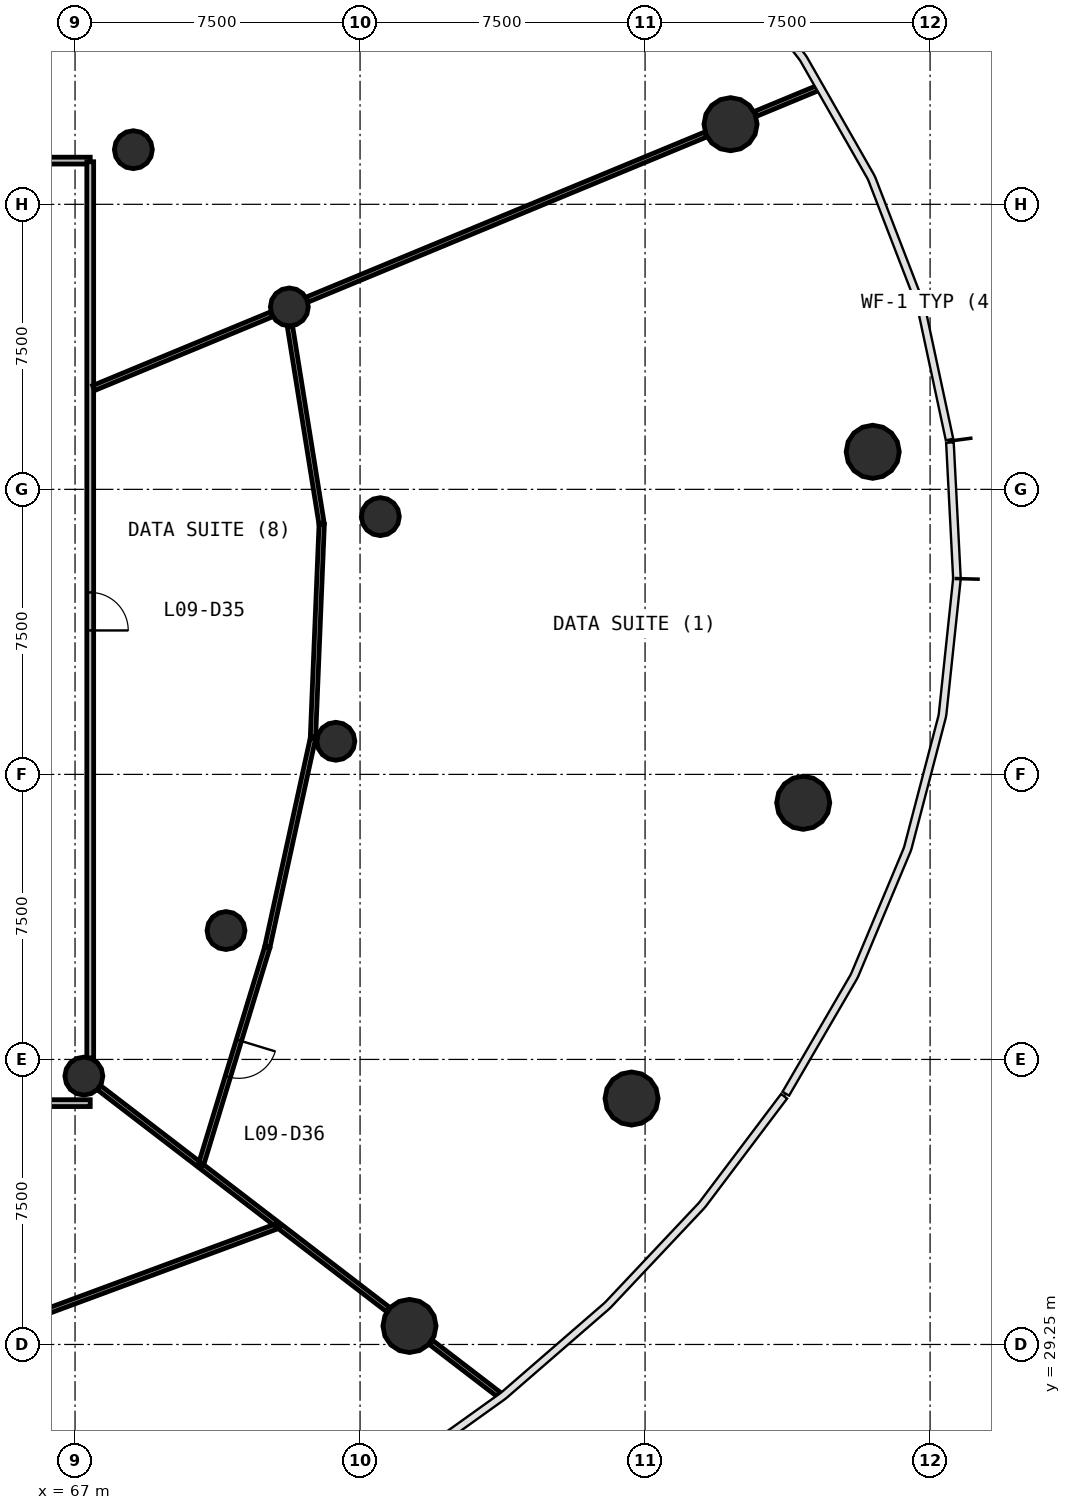
"""IFC4 building model, lengths in metres.
Left out: names, types, materials, properties, quantities, classifications, styles, units other than length and angle.
Written with IfcOpenShell. Run it as: python <this file> out.ifc"""

import sys

from ifc_helpers import new_model, si_unit, direction, frame, frame_2d, origin, origin_2d, place, context, subcontext, project, spatial, rectangle, circle, extrude, source, transform, mapped, element, fill, save


model = new_model("IFC4")
c1 = context("Model", 3, precision=1e-05, world=origin(), true_north=direction((0.0, 1.0)))
c2 = subcontext(c1, "Body", "Model", "MODEL_VIEW")
j1 = project(units=[si_unit("LENGTHUNIT", "METRE"), si_unit("PLANEANGLEUNIT", "RADIAN")], contexts=[c1])
p1 = place(None, origin())
s1 = spatial("IfcSite", under=j1, at=p1, CompositionType="ELEMENT")
p2 = place(p1, origin())
s2 = spatial("IfcBuilding", under=s1, at=p2, CompositionType="ELEMENT")
p3 = place(p2, frame((0.0, 0.0, 40.2)))
s3 = spatial("IfcBuildingStorey", under=s2, at=p3, CompositionType="ELEMENT", Elevation=40.2)
m1 = source(origin(), c2, "Body", "SweptSolid", [
    extrude(circle(Radius=0.7, at=origin_2d()), origin(), (0.0, 0.0, 1.0), 4.4),
])
for number, where, z_axis, x_axis in (
    (1, (87.99, 52.738, 0.0), (0.0, 0.0, 1.0), (1.0, 0.0, 0.0)),
    (2, (84.249, 61.358, 0.0), (0.0, 0.0, 1.0), (1.0, 0.0, 0.0)),
    (3, (75.801, 29.737, 0.0), (0.0, 0.0, 1.0), (1.0, 0.0, 0.0)),
    (4, (81.645, 35.721, 0.0), (0.0, 0.0, 1.0), (1.0, 0.0, 0.0)),
    (5, (86.161, 43.503, 0.0), (0.0, 0.0, 1.0), (1.0, 0.0, 0.0)),
):
    element("IfcColumn", number, at=place(p3, frame(where, z_axis=z_axis, x_axis=x_axis)), inside=s3, PredefinedType="COLUMN", context=c2, shape_type="MappedRepresentation", body=[
        mapped(m1, transform((0.0, 0.0, 0.0), scale=1.0)),
    ])
m2 = source(origin(), c2, "Body", "SweptSolid", [
    extrude(circle(Radius=0.5, at=origin_2d()), origin(), (0.0, 0.0, 1.0), 4.4),
])
for number, where, z_axis, x_axis in (
    (6, (75.034, 51.032, 0.0), (0.0, 0.0, 1.0), (1.0, 0.0, 0.0)),
    (7, (72.639, 56.549, 0.0), (0.0, 0.0, 1.0), (1.0, 0.0, 0.0)),
    (8, (68.535, 60.688, 0.0), (0.0, 0.0, 1.0), (1.0, 0.0, 0.0)),
    (9, (67.232, 36.312, 0.0), (0.0, 0.0, 1.0), (1.0, 0.0, 0.0)),
    (10, (70.972, 40.141, 0.0), (0.0, 0.0, 1.0), (1.0, 0.0, 0.0)),
    (11, (73.863, 45.122, 0.0), (0.0, 0.0, 1.0), (1.0, 0.0, 0.0)),
):
    element("IfcColumn", number, at=place(p3, frame(where, z_axis=z_axis, x_axis=x_axis)), inside=s3, PredefinedType="COLUMN", context=c2, shape_type="MappedRepresentation", body=[
        mapped(m2, transform((0.0, 0.0, 0.0), scale=1.0)),
    ])
p4 = place(p3, frame((67.4, 35.6, 0.0), z_axis=(0.0, 0.0, 1.0), x_axis=(-1.0, 0.0, 0.0)))
e12 = element("IfcWall", 12, at=p4, inside=s3, PredefinedType="PARTITIONING", context=c2, shape_type="SweptSolid", body=[
    extrude(rectangle(XDim=30.8, YDim=0.18, at=frame_2d((15.4, 0.0))), origin(), (0.0, 0.0, 1.0), 3.05),
])
p5 = place(p4, frame((17.35, 0.0, 0.0)))
e13 = element("IfcOpeningElement", 13, at=p5, cuts=e12, PredefinedType="OPENING", context=c2, shape_type="SweptSolid", body=[
    extrude(rectangle(XDim=1.0, YDim=2.1, at=frame_2d((0.5, 1.05))), frame((0.0, 0.1, 0.0), z_axis=(0.0, -1.0, 0.0), x_axis=(1.0, 0.0, 0.0)), (0.0, 0.0, 1.0), 0.2),
])
p6 = place(p4, frame((14.95, 0.0, 0.0)))
e14 = element("IfcOpeningElement", 14, at=p6, cuts=e12, PredefinedType="OPENING", context=c2, shape_type="SweptSolid", body=[
    extrude(rectangle(XDim=1.0, YDim=2.1, at=frame_2d((0.5, 1.05))), frame((0.0, 0.1, 0.0), z_axis=(0.0, -1.0, 0.0), x_axis=(1.0, 0.0, 0.0)), (0.0, 0.0, 1.0), 0.2),
])
p7 = place(p3, frame((36.6, 60.4, 0.0), z_axis=(0.0, 0.0, 1.0), x_axis=(1.0, 0.0, 0.0)))
e15 = element("IfcWall", 15, at=p7, inside=s3, PredefinedType="PARTITIONING", context=c2, shape_type="SweptSolid", body=[
    extrude(rectangle(XDim=30.8, YDim=0.18, at=frame_2d((15.4, 0.0))), origin(), (0.0, 0.0, 1.0), 3.05),
])
p8 = place(p7, frame((20.95, 0.0, 0.0)))
e16 = element("IfcOpeningElement", 16, at=p8, cuts=e15, PredefinedType="OPENING", context=c2, shape_type="SweptSolid", body=[
    extrude(rectangle(XDim=1.0, YDim=2.1, at=frame_2d((0.5, 1.05))), frame((0.0, 0.1, 0.0), z_axis=(0.0, -1.0, 0.0), x_axis=(1.0, 0.0, 0.0)), (0.0, 0.0, 1.0), 0.2),
])
p9 = place(p7, frame((14.95, 0.0, 0.0)))
e17 = element("IfcOpeningElement", 17, at=p9, cuts=e15, PredefinedType="OPENING", context=c2, shape_type="SweptSolid", body=[
    extrude(rectangle(XDim=1.0, YDim=2.1, at=frame_2d((0.5, 1.05))), frame((0.0, 0.1, 0.0), z_axis=(0.0, -1.0, 0.0), x_axis=(1.0, 0.0, 0.0)), (0.0, 0.0, 1.0), 0.2),
])
p10 = place(p7, frame((8.95, 0.0, 0.0)))
e18 = element("IfcOpeningElement", 18, at=p10, cuts=e15, PredefinedType="OPENING", context=c2, shape_type="SweptSolid", body=[
    extrude(rectangle(XDim=1.0, YDim=2.1, at=frame_2d((0.5, 1.05))), frame((0.0, 0.1, 0.0), z_axis=(0.0, -1.0, 0.0), x_axis=(1.0, 0.0, 0.0)), (0.0, 0.0, 1.0), 0.2),
])
p11 = place(p3, frame((67.4, 60.37, 0.0), z_axis=(0.0, 0.0, 1.0), x_axis=(0.0, -1.0, 0.0)))
e19 = element("IfcWall", 19, at=p11, inside=s3, PredefinedType="PARTITIONING", context=c2, shape_type="SweptSolid", body=[
    extrude(rectangle(XDim=23.583, YDim=0.18, at=frame_2d((11.791, 0.0))), origin(), (0.0, 0.0, 1.0), 3.05),
])
p12 = place(p11, frame((11.333, 0.0, 0.0)))
e20 = element("IfcOpeningElement", 20, at=p12, cuts=e19, PredefinedType="OPENING", context=c2, shape_type="SweptSolid", body=[
    extrude(rectangle(XDim=1.0, YDim=2.1, at=frame_2d((0.5, 1.05))), frame((0.0, 0.1, 0.0), z_axis=(0.0, -1.0, 0.0), x_axis=(1.0, 0.0, 0.0)), (0.0, 0.0, 1.0), 0.2),
])
p13 = place(p3, frame((73.106, 56.742, 0.0), z_axis=(0.0, 0.0, 1.0), x_axis=(0.923875075531, 0.382694192291, 0.0)))
e21 = element("IfcWall", 21, at=p13, inside=s3, PredefinedType="PARTITIONING", context=c2, shape_type="SweptSolid", body=[
    extrude(rectangle(XDim=11.356, YDim=0.14, at=frame_2d((5.678, 0.0))), origin(), (0.0, 0.0, 1.0), 3.05),
])
p14 = place(p3, frame((65.84, 29.964, 0.0), z_axis=(0.0, 0.0, 1.0), x_axis=(0.937795770534, 0.347187402953, 0.0)))
e22 = element("IfcWall", 22, at=p14, inside=s3, PredefinedType="PARTITIONING", context=c2, shape_type="SweptSolid", body=[
    extrude(rectangle(XDim=6.952, YDim=0.14, at=frame_2d((3.476, 0.0))), origin(), (0.0, 0.0, 1.0), 3.05),
])
p15 = place(p3, frame((72.056, 39.692, 0.0), z_axis=(0.0, 0.0, 1.0), x_axis=(-0.291746072941, -0.95649580706, 0.0)))
e23 = element("IfcWall", 23, at=p15, inside=s3, PredefinedType="PARTITIONING", context=c2, shape_type="SweptSolid", body=[
    extrude(rectangle(XDim=6.0, YDim=0.14, at=frame_2d((3.0, 0.0))), origin(), (0.0, 0.0, 1.0), 3.05),
])
p16 = place(p15, frame((2.55, 0.0, 0.0)))
e24 = element("IfcOpeningElement", 24, at=p16, cuts=e23, PredefinedType="OPENING", context=c2, shape_type="SweptSolid", body=[
    extrude(rectangle(XDim=1.0, YDim=2.1, at=frame_2d((0.5, 1.05))), frame((0.0, 0.08, 0.0), z_axis=(0.0, -1.0, 0.0), x_axis=(1.0, 0.0, 0.0)), (0.0, 0.0, 1.0), 0.16),
])
p17 = place(p3, frame((72.063, 39.722, 0.0), z_axis=(0.0, 0.0, 1.0), x_axis=(0.213380114585, 0.97696925576, 0.0)))
e25 = element("IfcWall", 25, at=p17, inside=s3, PredefinedType="PARTITIONING", context=c2, shape_type="SweptSolid", body=[
    extrude(rectangle(XDim=5.609, YDim=0.14, at=frame_2d((2.804, 0.0))), origin(), (0.0, 0.0, 1.0), 3.05),
])
p18 = place(p3, frame((73.261, 45.231, 0.0), z_axis=(0.0, 0.0, 1.0), x_axis=(0.041003428889, 0.999159005774, 0.0)))
e26 = element("IfcWall", 26, at=p18, inside=s3, PredefinedType="PARTITIONING", context=c2, shape_type="SweptSolid", body=[
    extrude(rectangle(XDim=5.603, YDim=0.14, at=frame_2d((2.801, 0.0))), origin(), (0.0, 0.0, 1.0), 3.05),
])
p19 = place(p3, frame((73.486, 50.859, 0.0), z_axis=(0.0, 0.0, 1.0), x_axis=(-0.158320440448, 0.987387785086, 0.0)))
e27 = element("IfcWall", 27, at=p19, inside=s3, PredefinedType="PARTITIONING", context=c2, shape_type="SweptSolid", body=[
    extrude(rectangle(XDim=5.252, YDim=0.14, at=frame_2d((2.626, 0.0))), origin(), (0.0, 0.0, 1.0), 3.05),
])
p20 = place(p3, frame((67.49, 54.416, 0.0), z_axis=(0.0, 0.0, 1.0), x_axis=(0.923890025086, 0.382658100067, 0.0)))
e28 = element("IfcWall", 28, at=p20, inside=s3, PredefinedType="PARTITIONING", context=c2, shape_type="SweptSolid", body=[
    extrude(rectangle(XDim=5.068, YDim=0.14, at=frame_2d((2.534, 0.0))), origin(), (0.0, 0.0, 1.0), 3.05),
])
p21 = place(p3, frame((72.383, 32.359, 0.0), z_axis=(0.0, 0.0, 1.0), x_axis=(0.793374011923, -0.608734488267, 0.0)))
e29 = element("IfcWall", 29, at=p21, inside=s3, PredefinedType="PARTITIONING", context=c2, shape_type="SweptSolid", body=[
    extrude(rectangle(XDim=3.603, YDim=0.14, at=frame_2d((1.802, 0.0))), origin(), (0.0, 0.0, 1.0), 3.05),
])
p22 = place(p3, frame((67.633, 36.005, 0.0), z_axis=(0.0, 0.0, 1.0), x_axis=(0.793345111692, -0.608772152579, 0.0)))
e30 = element("IfcWall", 30, at=p22, inside=s3, PredefinedType="PARTITIONING", context=c2, shape_type="SweptSolid", body=[
    extrude(rectangle(XDim=3.295, YDim=0.14, at=frame_2d((1.647, 0.0))), origin(), (0.0, 0.0, 1.0), 3.05),
])
p23 = place(p3, frame((70.33, 33.935, 0.0), z_axis=(0.0, 0.0, 1.0), x_axis=(0.793360275681, -0.608752390526, 0.0)))
e31 = element("IfcWall", 31, at=p23, inside=s3, PredefinedType="PARTITIONING", context=c2, shape_type="SweptSolid", body=[
    extrude(rectangle(XDim=2.476, YDim=0.14, at=frame_2d((1.238, 0.0))), origin(), (0.0, 0.0, 1.0), 3.05),
])
p24 = place(p3, frame((76.359, 29.309, 0.0), z_axis=(0.0, 0.0, 1.0), x_axis=(0.793298337488, -0.608833103353, 0.0)))
e32 = element("IfcWall", 32, at=p24, inside=s3, PredefinedType="PARTITIONING", context=c2, shape_type="SweptSolid", body=[
    extrude(rectangle(XDim=2.246, YDim=0.14, at=frame_2d((1.123, 0.0))), origin(), (0.0, 0.0, 1.0), 3.05),
])
p25 = place(p3, frame((84.9, 61.628, 0.0), z_axis=(0.0, 0.0, 1.0), x_axis=(0.92390604877, 0.382619410179, 0.0)))
e33 = element("IfcWall", 33, at=p25, inside=s3, PredefinedType="PARTITIONING", context=c2, shape_type="SweptSolid", body=[
    extrude(rectangle(XDim=1.772, YDim=0.14, at=frame_2d((0.886, 0.0))), origin(), (0.0, 0.0, 1.0), 3.05),
])
m3 = source(origin(), c2, "Body", "SweptSolid", [
    extrude(rectangle(XDim=1.0, YDim=2.1, at=frame_2d((0.5, 1.05))), frame((0.0, 0.025, 0.0), z_axis=(0.0, -1.0, 0.0), x_axis=(1.0, 0.0, 0.0)), (0.0, 0.0, 1.0), 0.05),
])
p26 = place(p12, origin())
e34 = element("IfcDoor", 34, at=p26, inside=s3, OperationType="SINGLE_SWING_RIGHT", PredefinedType="DOOR", context=c2, shape_type="MappedRepresentation", body=[
    mapped(m3, transform((0.0, 0.0, 0.0), scale=1.0)),
])
fill(e20, e34)
p27 = place(p16, origin())
e35 = element("IfcDoor", 35, at=p27, inside=s3, OperationType="SINGLE_SWING_LEFT", PredefinedType="DOOR", context=c2, shape_type="MappedRepresentation", body=[
    mapped(m3, transform((0.0, 0.0, 0.0), scale=1.0)),
])
fill(e24, e35)
save(model, sys.argv[1])
